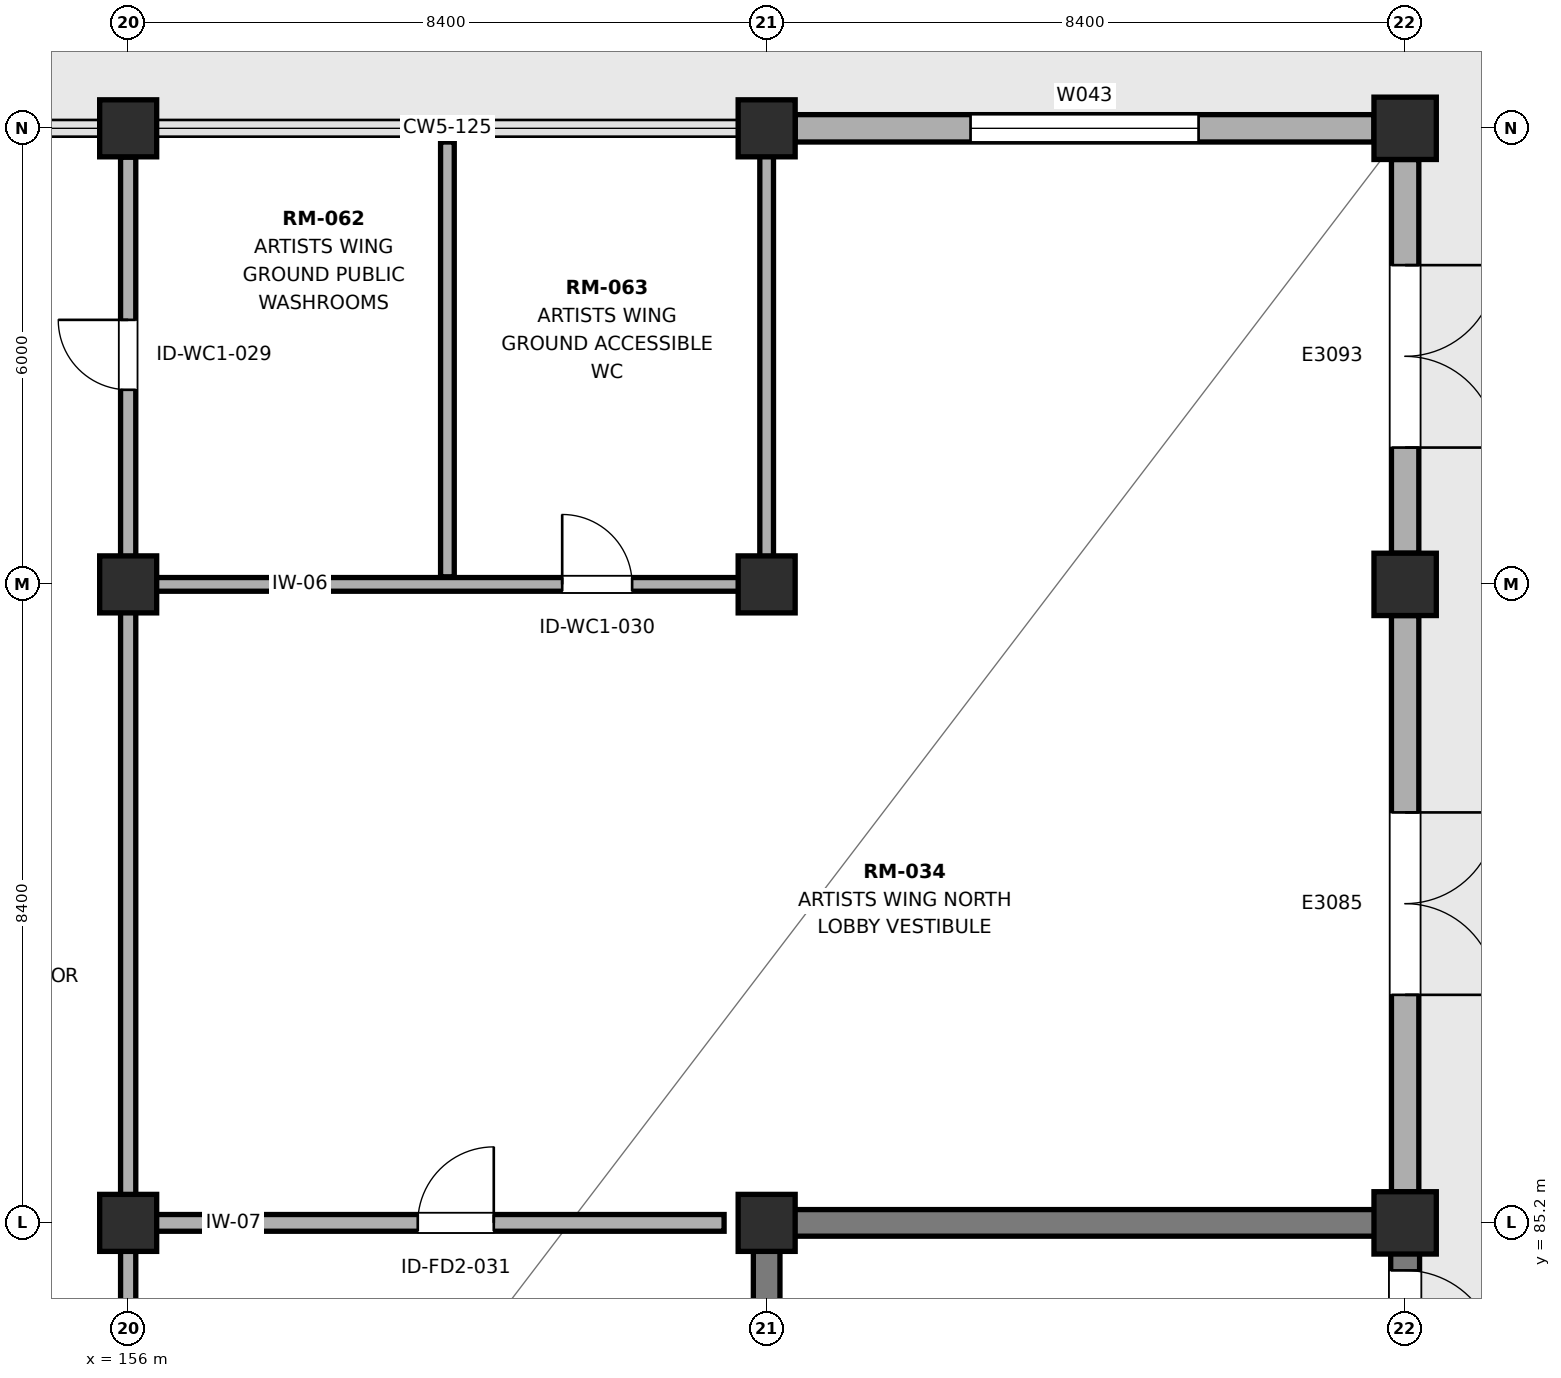
"""IFC4 building model, lengths in metres.
Left out: names, types, materials, properties, quantities, classifications, styles, units other than length and angle.
Written with IfcOpenShell. Run it as: python <this file> out.ifc"""

import sys

from ifc_helpers import new_model, si_unit, direction, frame, frame_2d, origin, origin_2d, place, context, subcontext, project, spatial, rectangle, extrude, element, fill, save


model = new_model("IFC4")
c1 = context("Model", 3, precision=1e-05, world=origin(), true_north=direction((0.0, 1.0)))
c2 = subcontext(c1, "Body", "Model", "MODEL_VIEW")
j1 = project(units=[si_unit("LENGTHUNIT", "METRE"), si_unit("PLANEANGLEUNIT", "RADIAN")], contexts=[c1])
p1 = place(None, origin())
s1 = spatial("IfcSite", under=j1, at=p1, CompositionType="ELEMENT")
p2 = place(p1, origin())
s2 = spatial("IfcBuilding", under=s1, at=p2, CompositionType="ELEMENT")
p3 = place(p2, origin())
s3 = spatial("IfcBuildingStorey", under=s2, at=p3, CompositionType="ELEMENT", Elevation=0.0)
for number, where, z_axis, x_axis in (
    (1, (156.0, 85.2, 0.0), (0.0, 0.0, 1.0), (1.0, 0.0, 0.0)),
    (2, (156.0, 93.6, 0.0), (0.0, 0.0, 1.0), (1.0, 0.0, 0.0)),
    (3, (156.0, 99.6, 0.0), (0.0, 0.0, 1.0), (1.0, 0.0, 0.0)),
    (4, (164.4, 85.2, 0.0), (0.0, 0.0, 1.0), (1.0, 0.0, 0.0)),
    (5, (164.4, 93.6, 0.0), (0.0, 0.0, 1.0), (1.0, 0.0, 0.0)),
    (6, (164.4, 99.6, 0.0), (0.0, 0.0, 1.0), (1.0, 0.0, 0.0)),
):
    element("IfcColumn", number, at=place(p3, frame(where, z_axis=z_axis, x_axis=x_axis)), inside=s3, PredefinedType="COLUMN", context=c2, shape_type="SweptSolid", body=[
        extrude(rectangle(XDim=0.75, YDim=0.75, at=origin_2d()), origin(), (0.0, 0.0, 1.0), 5.4),
    ])
for number, where, z_axis, x_axis in (
    (7, (172.8, 85.2, 0.0), (0.0, 0.0, 1.0), (1.0, 0.0, 0.0)),
    (8, (172.8, 93.6, 0.0), (0.0, 0.0, 1.0), (1.0, 0.0, 0.0)),
    (9, (172.8, 99.6, 0.0), (0.0, 0.0, 1.0), (1.0, 0.0, 0.0)),
):
    element("IfcColumn", number, at=place(p3, frame(where, z_axis=z_axis, x_axis=x_axis)), inside=s3, PredefinedType="COLUMN", context=c2, shape_type="SweptSolid", body=[
        extrude(rectangle(XDim=0.82, YDim=0.82, at=origin_2d()), origin(), (0.0, 0.0, 1.0), 5.4),
    ])
p4 = place(p3, frame((164.225, 85.2, 0.0), z_axis=(0.0, 0.0, 1.0), x_axis=(1.0, 0.0, 0.0)))
e10 = element("IfcWall", 10, at=p4, inside=s3, PredefinedType="SHEAR", context=c2, shape_type="SweptSolid", body=[
    extrude(rectangle(XDim=8.75, YDim=0.35, at=frame_2d((4.375, 0.0))), origin(), (0.0, 0.0, 1.0), 5.4),
])
p5 = place(p3, frame((164.4, 77.575, 0.0), z_axis=(0.0, 0.0, 1.0), x_axis=(0.0, 1.0, 0.0)))
e11 = element("IfcWall", 11, at=p5, inside=s3, PredefinedType="SHEAR", context=c2, shape_type="SweptSolid", body=[
    extrude(rectangle(XDim=7.45, YDim=0.35, at=frame_2d((3.725, 0.0))), origin(), (0.0, 0.0, 1.0), 5.4),
])
p6 = place(p5, frame((2.1, 0.0, 0.0)))
e12 = element("IfcOpeningElement", 12, at=p6, cuts=e11, PredefinedType="OPENING", context=c2, shape_type="SweptSolid", body=[
    extrude(rectangle(XDim=1.1, YDim=2.2, at=frame_2d((0.55, 1.1))), frame((0.0, 0.185, 0.0), z_axis=(0.0, -1.0, 0.0), x_axis=(1.0, 0.0, 0.0)), (0.0, 0.0, 1.0), 0.37),
])
p7 = place(p3, frame((172.8, 77.575, 0.0), z_axis=(0.0, 0.0, 1.0), x_axis=(0.0, 1.0, 0.0)))
e13 = element("IfcWall", 13, at=p7, inside=s3, PredefinedType="SHEAR", context=c2, shape_type="SweptSolid", body=[
    extrude(rectangle(XDim=7.45, YDim=0.38, at=frame_2d((3.725, 0.0))), origin(), (0.0, 0.0, 1.0), 5.4),
])
p8 = place(p7, frame((5.8, 0.0, 0.0)))
e14 = element("IfcOpeningElement", 14, at=p8, cuts=e13, PredefinedType="OPENING", context=c2, shape_type="SweptSolid", body=[
    extrude(rectangle(XDim=1.2, YDim=2.3, at=frame_2d((0.6, 1.15))), frame((0.0, 0.2, 0.0), z_axis=(0.0, -1.0, 0.0), x_axis=(1.0, 0.0, 0.0)), (0.0, 0.0, 1.0), 0.4),
])
p9 = place(p3, frame((164.775, 99.6, 0.0), z_axis=(0.0, 0.0, 1.0), x_axis=(1.0, 0.0, 0.0)))
e15 = element("IfcWall", 15, at=p9, inside=s3, PredefinedType="SOLIDWALL", context=c2, shape_type="SweptSolid", body=[
    extrude(rectangle(XDim=7.615, YDim=0.36, at=frame_2d((3.808, 0.0))), origin(), (0.0, 0.0, 1.0), 4.34),
])
p10 = place(p9, frame((2.308, 0.0, 0.95)))
e16 = element("IfcOpeningElement", 16, at=p10, cuts=e15, PredefinedType="OPENING", context=c2, shape_type="SweptSolid", body=[
    extrude(rectangle(XDim=3.0, YDim=1.8, at=frame_2d((1.5, 0.9))), frame((0.0, 0.19, 0.0), z_axis=(0.0, -1.0, 0.0), x_axis=(1.0, 0.0, 0.0)), (0.0, 0.0, 1.0), 0.38),
])
p11 = place(p3, frame((172.8, 85.61, 0.0), z_axis=(0.0, 0.0, 1.0), x_axis=(0.0, 1.0, 0.0)))
e17 = element("IfcWall", 17, at=p11, inside=s3, PredefinedType="SOLIDWALL", context=c2, shape_type="SweptSolid", body=[
    extrude(rectangle(XDim=7.58, YDim=0.36, at=frame_2d((3.79, 0.0))), origin(), (0.0, 0.0, 1.0), 4.4),
])
p12 = place(p11, frame((2.59, 0.0, 0.0)))
e18 = element("IfcOpeningElement", 18, at=p12, cuts=e17, PredefinedType="OPENING", context=c2, shape_type="SweptSolid", body=[
    extrude(rectangle(XDim=2.4, YDim=2.6, at=frame_2d((1.2, 1.3))), frame((0.0, 0.19, 0.0), z_axis=(0.0, -1.0, 0.0), x_axis=(1.0, 0.0, 0.0)), (0.0, 0.0, 1.0), 0.38),
])
p13 = place(p3, frame((172.8, 94.01, 0.0), z_axis=(0.0, 0.0, 1.0), x_axis=(0.0, 1.0, 0.0)))
e19 = element("IfcWall", 19, at=p13, inside=s3, PredefinedType="SOLIDWALL", context=c2, shape_type="SweptSolid", body=[
    extrude(rectangle(XDim=5.18, YDim=0.36, at=frame_2d((2.59, 0.0))), origin(), (0.0, 0.0, 1.0), 4.4),
])
p14 = place(p13, frame((1.39, 0.0, 0.0)))
e20 = element("IfcOpeningElement", 20, at=p14, cuts=e19, PredefinedType="OPENING", context=c2, shape_type="SweptSolid", body=[
    extrude(rectangle(XDim=2.4, YDim=2.6, at=frame_2d((1.2, 1.3))), frame((0.0, 0.19, 0.0), z_axis=(0.0, -1.0, 0.0), x_axis=(1.0, 0.0, 0.0)), (0.0, 0.0, 1.0), 0.38),
])
p15 = place(p3, frame((156.0, 30.36, 0.0), z_axis=(0.0, 0.0, 1.0), x_axis=(0.0, 1.0, 0.0)))
e21 = element("IfcWall", 21, at=p15, inside=s3, PredefinedType="PARTITIONING", context=c2, shape_type="SweptSolid", body=[
    extrude(rectangle(XDim=68.86, YDim=0.2, at=frame_2d((34.43, 0.0))), origin(), (0.0, 0.0, 1.0), 4.3),
])
p16 = place(p15, frame((12.0, 0.0, 0.0)))
e22 = element("IfcOpeningElement", 22, at=p16, cuts=e21, PredefinedType="OPENING", context=c2, shape_type="SweptSolid", body=[
    extrude(rectangle(XDim=1.05, YDim=2.25, at=frame_2d((0.525, 1.125))), frame((0.0, 0.11, 0.0), z_axis=(0.0, -1.0, 0.0), x_axis=(1.0, 0.0, 0.0)), (0.0, 0.0, 1.0), 0.22),
])
p17 = place(p15, frame((30.0, 0.0, 0.0)))
e23 = element("IfcOpeningElement", 23, at=p17, cuts=e21, PredefinedType="OPENING", context=c2, shape_type="SweptSolid", body=[
    extrude(rectangle(XDim=1.02, YDim=2.18, at=frame_2d((0.51, 1.09))), frame((0.0, 0.11, 0.0), z_axis=(0.0, -1.0, 0.0), x_axis=(1.0, 0.0, 0.0)), (0.0, 0.0, 1.0), 0.22),
])
p18 = place(p15, frame((65.8, 0.0, 0.0)))
e24 = element("IfcOpeningElement", 24, at=p18, cuts=e21, PredefinedType="OPENING", context=c2, shape_type="SweptSolid", body=[
    extrude(rectangle(XDim=0.92, YDim=2.15, at=frame_2d((0.46, 1.075))), frame((0.0, 0.11, 0.0), z_axis=(0.0, -1.0, 0.0), x_axis=(1.0, 0.0, 0.0)), (0.0, 0.0, 1.0), 0.22),
])
p19 = place(p3, frame((156.11, 93.6, 0.0), z_axis=(0.0, 0.0, 1.0), x_axis=(1.0, 0.0, 0.0)))
e25 = element("IfcWall", 25, at=p19, inside=s3, PredefinedType="PARTITIONING", context=c2, shape_type="SweptSolid", body=[
    extrude(rectangle(XDim=8.38, YDim=0.18, at=frame_2d((4.19, 0.0))), origin(), (0.0, 0.0, 1.0), 4.35),
])
p20 = place(p19, frame((5.6, 0.0, 0.0)))
e26 = element("IfcOpeningElement", 26, at=p20, cuts=e25, PredefinedType="OPENING", context=c2, shape_type="SweptSolid", body=[
    extrude(rectangle(XDim=0.92, YDim=2.15, at=frame_2d((0.46, 1.075))), frame((0.0, 0.1, 0.0), z_axis=(0.0, -1.0, 0.0), x_axis=(1.0, 0.0, 0.0)), (0.0, 0.0, 1.0), 0.2),
])
p21 = place(p3, frame((164.4, 93.7, 0.0), z_axis=(0.0, 0.0, 1.0), x_axis=(0.0, 1.0, 0.0)))
e27 = element("IfcWall", 27, at=p21, inside=s3, PredefinedType="PARTITIONING", context=c2, shape_type="SweptSolid", body=[
    extrude(rectangle(XDim=5.72, YDim=0.18, at=frame_2d((2.86, 0.0))), origin(), (0.0, 0.0, 1.0), 4.45),
])
p22 = place(p3, frame((160.2, 93.7, 0.0), z_axis=(0.0, 0.0, 1.0), x_axis=(0.0, 1.0, 0.0)))
e28 = element("IfcWall", 28, at=p22, inside=s3, PredefinedType="PARTITIONING", context=c2, shape_type="SweptSolid", body=[
    extrude(rectangle(XDim=5.72, YDim=0.18, at=frame_2d((2.86, 0.0))), origin(), (0.0, 0.0, 1.0), 4.535),
])
p23 = place(p3, frame((156.31, 85.2, 0.0), z_axis=(0.0, 0.0, 1.0), x_axis=(1.0, 0.0, 0.0)))
e29 = element("IfcWall", 29, at=p23, inside=s3, PredefinedType="PARTITIONING", context=c2, shape_type="SweptSolid", body=[
    extrude(rectangle(XDim=7.53, YDim=0.22, at=frame_2d((3.765, 0.0))), origin(), (0.0, 0.0, 1.0), 4.34),
])
p24 = place(p23, frame((3.5, 0.0, 0.0)))
e30 = element("IfcOpeningElement", 30, at=p24, cuts=e29, PredefinedType="OPENING", context=c2, shape_type="SweptSolid", body=[
    extrude(rectangle(XDim=1.0, YDim=2.2, at=frame_2d((0.5, 1.1))), frame((0.0, 0.12, 0.0), z_axis=(0.0, -1.0, 0.0), x_axis=(1.0, 0.0, 0.0)), (0.0, 0.0, 1.0), 0.24),
])
p25 = place(p10, origin())
e31 = element("IfcWindow", 31, at=p25, inside=s3, PartitioningType="SINGLE_PANEL", PredefinedType="WINDOW", context=c2, shape_type="SweptSolid", body=[
    extrude(rectangle(XDim=3.0, YDim=1.8, at=frame_2d((1.5, 0.9))), frame((0.0, 0.03, 0.0), z_axis=(0.0, -1.0, 0.0), x_axis=(1.0, 0.0, 0.0)), (0.0, 0.0, 1.0), 0.06),
])
fill(e16, e31)
p26 = place(p12, frame((2.4, 0.0, 0.0), z_axis=(0.0, 0.0, 1.0), x_axis=(-1.0, 0.0, 0.0)))
e32 = element("IfcDoor", 32, at=p26, inside=s3, OperationType="DOUBLE_DOOR_SINGLE_SWING", PredefinedType="DOOR", context=c2, shape_type="SweptSolid", body=[
    extrude(rectangle(XDim=2.4, YDim=2.6, at=frame_2d((1.2, 1.3))), frame((0.0, 0.025, 0.0), z_axis=(0.0, -1.0, 0.0), x_axis=(1.0, 0.0, 0.0)), (0.0, 0.0, 1.0), 0.05),
])
fill(e18, e32)
p27 = place(p14, frame((2.4, 0.0, 0.0), z_axis=(0.0, 0.0, 1.0), x_axis=(-1.0, 0.0, 0.0)))
e33 = element("IfcDoor", 33, at=p27, inside=s3, OperationType="DOUBLE_DOOR_SINGLE_SWING", PredefinedType="DOOR", context=c2, shape_type="SweptSolid", body=[
    extrude(rectangle(XDim=2.4, YDim=2.6, at=frame_2d((1.2, 1.3))), frame((0.0, 0.025, 0.0), z_axis=(0.0, -1.0, 0.0), x_axis=(1.0, 0.0, 0.0)), (0.0, 0.0, 1.0), 0.05),
])
fill(e20, e33)
p28 = place(p8, frame((1.2, 0.0, 0.0), z_axis=(0.0, 0.0, 1.0), x_axis=(-1.0, 0.0, 0.0)))
e34 = element("IfcDoor", 34, at=p28, inside=s3, OperationType="SINGLE_SWING_LEFT", PredefinedType="DOOR", context=c2, shape_type="SweptSolid", body=[
    extrude(rectangle(XDim=1.2, YDim=2.3, at=frame_2d((0.6, 1.15))), frame((0.0, 0.025, 0.0), z_axis=(0.0, -1.0, 0.0), x_axis=(1.0, 0.0, 0.0)), (0.0, 0.0, 1.0), 0.05),
])
fill(e14, e34)
p29 = place(p18, origin())
e35 = element("IfcDoor", 35, at=p29, inside=s3, OperationType="SINGLE_SWING_RIGHT", PredefinedType="DOOR", context=c2, shape_type="SweptSolid", body=[
    extrude(rectangle(XDim=0.92, YDim=2.15, at=frame_2d((0.46, 1.075))), frame((0.0, 0.025, 0.0), z_axis=(0.0, -1.0, 0.0), x_axis=(1.0, 0.0, 0.0)), (0.0, 0.0, 1.0), 0.05),
])
fill(e24, e35)
p30 = place(p20, origin())
e36 = element("IfcDoor", 36, at=p30, inside=s3, OperationType="SINGLE_SWING_LEFT", PredefinedType="DOOR", context=c2, shape_type="SweptSolid", body=[
    extrude(rectangle(XDim=0.92, YDim=2.15, at=frame_2d((0.46, 1.075))), frame((0.0, 0.025, 0.0), z_axis=(0.0, -1.0, 0.0), x_axis=(1.0, 0.0, 0.0)), (0.0, 0.0, 1.0), 0.05),
])
fill(e26, e36)
p31 = place(p24, origin())
e37 = element("IfcDoor", 37, at=p31, inside=s3, OperationType="SINGLE_SWING_RIGHT", PredefinedType="DOOR", context=c2, shape_type="SweptSolid", body=[
    extrude(rectangle(XDim=1.0, YDim=2.2, at=frame_2d((0.5, 1.1))), frame((0.0, 0.025, 0.0), z_axis=(0.0, -1.0, 0.0), x_axis=(1.0, 0.0, 0.0)), (0.0, 0.0, 1.0), 0.05),
])
fill(e30, e37)
save(model, sys.argv[1])
